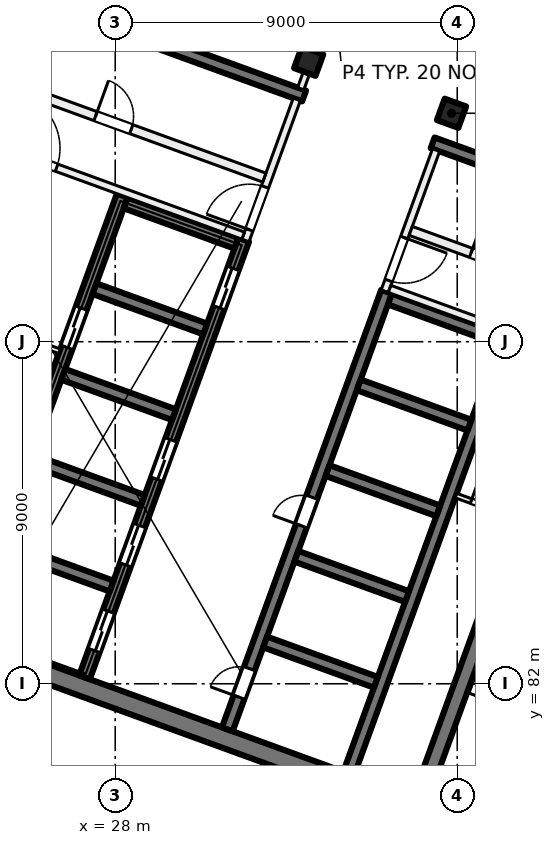
"""IFC4 building model, lengths in metres.
Left out: names, types, materials, properties, quantities, classifications, styles, units other than length and angle.
Written with IfcOpenShell. Run it as: python <this file> out.ifc"""

import sys

from ifc_helpers import new_model, si_unit, direction, frame, frame_2d, origin, origin_2d, place, context, subcontext, project, spatial, rectangle, extrude, element, fill, save


model = new_model("IFC4")
c1 = context("Model", 3, precision=1e-05, world=origin(), true_north=direction((0.0, 1.0)))
c2 = subcontext(c1, "Body", "Model", "MODEL_VIEW")
j1 = project(units=[si_unit("LENGTHUNIT", "METRE"), si_unit("PLANEANGLEUNIT", "RADIAN")], contexts=[c1])
p1 = place(None, origin())
s1 = spatial("IfcSite", under=j1, at=p1, CompositionType="ELEMENT")
p2 = place(p1, origin())
s2 = spatial("IfcBuilding", under=s1, at=p2, CompositionType="ELEMENT")
p3 = place(p2, frame((0.0, 0.0, 232.0)))
s3 = spatial("IfcBuildingStorey", under=s2, at=p3, CompositionType="ELEMENT", Elevation=232.0)
for number, where, z_axis, x_axis in (
    (1, (36.849, 97.011, 0.0), (0.0, 0.0, 1.0), (-0.342, -0.94, 0.0)),
    (2, (33.091, 98.379, 0.0), (0.0, 0.0, 1.0), (-0.342, -0.94, 0.0)),
):
    element("IfcColumn", number, at=place(p3, frame(where, z_axis=z_axis, x_axis=x_axis)), inside=s3, PredefinedType="COLUMN", context=c2, shape_type="SweptSolid", body=[
        extrude(rectangle(XDim=0.6, YDim=0.6, at=origin_2d()), origin(), (0.0, 0.0, 1.0), 4.0),
    ])
p4 = place(p3, frame((35.75, 78.788, 0.0), z_axis=(0.0, 0.0, 1.0), x_axis=(-0.939692894512, 0.342019391267, 0.0)))
e3 = element("IfcWall", 3, at=p4, inside=s3, PredefinedType="SHEAR", context=c2, shape_type="SweptSolid", body=[
    extrude(rectangle(XDim=14.4, YDim=0.5, at=frame_2d((7.2, 0.0))), origin(), (0.0, 0.0, 1.0), 4.0),
])
p5 = place(p3, frame((36.058, 79.048, 0.0), z_axis=(0.0, 0.0, 1.0), x_axis=(0.342016982193, 0.939693771338, 0.0)))
e4 = element("IfcWall", 4, at=p5, inside=s3, PredefinedType="SHEAR", context=c2, shape_type="SweptSolid", body=[
    extrude(rectangle(XDim=7.8, YDim=0.4, at=frame_2d((3.9, 0.0))), origin(), (0.0, 0.0, 1.0), 4.0),
])
p6 = place(p3, frame((30.949, 80.801, 0.0), z_axis=(0.0, 0.0, 1.0), x_axis=(0.342016684409, 0.939693879721, 0.0)))
e5 = element("IfcWall", 5, at=p6, inside=s3, PredefinedType="SHEAR", context=c2, shape_type="SweptSolid", body=[
    extrude(rectangle(XDim=12.25, YDim=0.3, at=frame_2d((6.125, 0.0))), origin(), (0.0, 0.0, 1.0), 4.0),
])
p7 = place(p6, frame((0.9, 0.0, 0.0)))
e6 = element("IfcOpeningElement", 6, at=p7, cuts=e5, PredefinedType="OPENING", context=c2, shape_type="SweptSolid", body=[
    extrude(rectangle(XDim=0.8, YDim=2.1, at=frame_2d((0.4, 1.05))), frame((0.0, 0.16, 0.0), z_axis=(0.0, -1.0, 0.0), x_axis=(1.0, 0.0, 0.0)), (0.0, 0.0, 1.0), 0.32),
])
p8 = place(p6, frame((5.7, 0.0, 0.0)))
e7 = element("IfcOpeningElement", 7, at=p8, cuts=e5, PredefinedType="OPENING", context=c2, shape_type="SweptSolid", body=[
    extrude(rectangle(XDim=0.8, YDim=2.1, at=frame_2d((0.4, 1.05))), frame((0.0, 0.16, 0.0), z_axis=(0.0, -1.0, 0.0), x_axis=(1.0, 0.0, 0.0)), (0.0, 0.0, 1.0), 0.32),
])
p9 = place(p3, frame((34.144, 79.638, 0.0), z_axis=(0.0, 0.0, 1.0), x_axis=(0.342016684409, 0.939693879721, 0.0)))
e8 = element("IfcWall", 8, at=p9, inside=s3, PredefinedType="SHEAR", context=c2, shape_type="SweptSolid", body=[
    extrude(rectangle(XDim=12.25, YDim=0.3, at=frame_2d((6.125, 0.0))), origin(), (0.0, 0.0, 1.0), 4.0),
])
p10 = place(p3, frame((34.858, 82.039, 0.0), z_axis=(0.0, 0.0, 1.0), x_axis=(-0.939689908313, 0.342027595692, 0.0)))
e9 = element("IfcWall", 9, at=p10, inside=s3, PredefinedType="SHEAR", context=c2, shape_type="SweptSolid", body=[
    extrude(rectangle(XDim=3.1, YDim=0.3, at=frame_2d((1.55, 0.0))), origin(), (0.0, 0.0, 1.0), 4.0),
])
p11 = place(p3, frame((35.679, 84.294, 0.0), z_axis=(0.0, 0.0, 1.0), x_axis=(-0.939706007505, 0.341983361377, 0.0)))
e10 = element("IfcWall", 10, at=p11, inside=s3, PredefinedType="SHEAR", context=c2, shape_type="SweptSolid", body=[
    extrude(rectangle(XDim=3.1, YDim=0.3, at=frame_2d((1.55, 0.0))), origin(), (0.0, 0.0, 1.0), 4.0),
])
for number, where, z_axis, x_axis in (
    (11, (36.5, 86.549, 0.0), (0.0, 0.0, 1.0), (-0.94, 0.342, 0.0)),
    (12, (37.321, 88.805, 0.0), (0.0, 0.0, 1.0), (-0.94, 0.342, 0.0)),
    (13, (38.142, 91.06, 0.0), (0.0, 0.0, 1.0), (-0.94, 0.342, 0.0)),
):
    element("IfcWall", number, at=place(p3, frame(where, z_axis=z_axis, x_axis=x_axis)), inside=s3, PredefinedType="SHEAR", context=c2, shape_type="SweptSolid", body=[
        extrude(rectangle(XDim=3.1, YDim=0.3, at=frame_2d((1.55, 0.0))), origin(), (0.0, 0.0, 1.0), 4.0),
    ])
p12 = place(p3, frame((27.191, 82.169, 0.0), z_axis=(0.0, 0.0, 1.0), x_axis=(0.342016684409, 0.939693879721, 0.0)))
e14 = element("IfcWall", 14, at=p12, inside=s3, PredefinedType="SHEAR", context=c2, shape_type="SweptSolid", body=[
    extrude(rectangle(XDim=12.25, YDim=0.3, at=frame_2d((6.125, 0.0))), origin(), (0.0, 0.0, 1.0), 4.0),
])
p13 = place(p12, frame((0.75, 0.0, 0.0)))
e15 = element("IfcOpeningElement", 15, at=p13, cuts=e14, PredefinedType="OPENING", context=c2, shape_type="SweptSolid", body=[
    extrude(rectangle(XDim=1.1, YDim=2.1, at=frame_2d((0.55, 1.05))), frame((0.0, 0.16, 0.0), z_axis=(0.0, -1.0, 0.0), x_axis=(1.0, 0.0, 0.0)), (0.0, 0.0, 1.0), 0.32),
])
p14 = place(p12, frame((3.15, 0.0, 0.0)))
e16 = element("IfcOpeningElement", 16, at=p14, cuts=e14, PredefinedType="OPENING", context=c2, shape_type="SweptSolid", body=[
    extrude(rectangle(XDim=1.1, YDim=2.1, at=frame_2d((0.55, 1.05))), frame((0.0, 0.16, 0.0), z_axis=(0.0, -1.0, 0.0), x_axis=(1.0, 0.0, 0.0)), (0.0, 0.0, 1.0), 0.32),
])
p15 = place(p12, frame((5.55, 0.0, 0.0)))
e17 = element("IfcOpeningElement", 17, at=p15, cuts=e14, PredefinedType="OPENING", context=c2, shape_type="SweptSolid", body=[
    extrude(rectangle(XDim=1.1, YDim=2.1, at=frame_2d((0.55, 1.05))), frame((0.0, 0.16, 0.0), z_axis=(0.0, -1.0, 0.0), x_axis=(1.0, 0.0, 0.0)), (0.0, 0.0, 1.0), 0.32),
])
p16 = place(p12, frame((10.35, 0.0, 0.0)))
e18 = element("IfcOpeningElement", 18, at=p16, cuts=e14, PredefinedType="OPENING", context=c2, shape_type="SweptSolid", body=[
    extrude(rectangle(XDim=1.1, YDim=2.1, at=frame_2d((0.55, 1.05))), frame((0.0, 0.16, 0.0), z_axis=(0.0, -1.0, 0.0), x_axis=(1.0, 0.0, 0.0)), (0.0, 0.0, 1.0), 0.32),
])
p17 = place(p3, frame((23.996, 83.332, 0.0), z_axis=(0.0, 0.0, 1.0), x_axis=(0.342016684409, 0.939693879721, 0.0)))
e19 = element("IfcWall", 19, at=p17, inside=s3, PredefinedType="SHEAR", context=c2, shape_type="SweptSolid", body=[
    extrude(rectangle(XDim=12.25, YDim=0.3, at=frame_2d((6.125, 0.0))), origin(), (0.0, 0.0, 1.0), 4.0),
])
p18 = place(p17, frame((8.0, 0.0, 0.0)))
e20 = element("IfcOpeningElement", 20, at=p18, cuts=e19, PredefinedType="OPENING", context=c2, shape_type="SweptSolid", body=[
    extrude(rectangle(XDim=1.1, YDim=2.1, at=frame_2d((0.55, 1.05))), frame((0.0, 0.16, 0.0), z_axis=(0.0, -1.0, 0.0), x_axis=(1.0, 0.0, 0.0)), (0.0, 0.0, 1.0), 0.32),
])
for number, where, z_axis, x_axis in (
    (21, (27.905, 84.57, 0.0), (0.0, 0.0, 1.0), (-0.94, 0.342, 0.0)),
    (22, (28.726, 86.825, 0.0), (0.0, 0.0, 1.0), (-0.94, 0.342, 0.0)),
    (23, (29.546, 89.08, 0.0), (0.0, 0.0, 1.0), (-0.94, 0.342, 0.0)),
):
    element("IfcWall", number, at=place(p3, frame(where, z_axis=z_axis, x_axis=x_axis)), inside=s3, PredefinedType="SHEAR", context=c2, shape_type="SweptSolid", body=[
        extrude(rectangle(XDim=3.1, YDim=0.3, at=frame_2d((1.55, 0.0))), origin(), (0.0, 0.0, 1.0), 4.0),
    ])
for number, where, z_axis, x_axis in (
    (24, (30.367, 91.336, 0.0), (0.0, 0.0, 1.0), (-0.94, 0.342, 0.0)),
    (25, (31.188, 93.591, 0.0), (0.0, 0.0, 1.0), (-0.94, 0.342, 0.0)),
):
    element("IfcWall", number, at=place(p3, frame(where, z_axis=z_axis, x_axis=x_axis)), inside=s3, PredefinedType="SHEAR", context=c2, shape_type="SweptSolid", body=[
        extrude(rectangle(XDim=3.1, YDim=0.3, at=frame_2d((1.55, 0.0))), origin(), (0.0, 0.0, 1.0), 4.0),
    ])
p19 = place(p3, frame((44.529, 93.258, 0.0), z_axis=(0.0, 0.0, 1.0), x_axis=(-0.9396917844, 0.342022441267, 0.0)))
e26 = element("IfcWall", 26, at=p19, inside=s3, PredefinedType="SHEAR", context=c2, shape_type="SweptSolid", body=[
    extrude(rectangle(XDim=8.7, YDim=0.3, at=frame_2d((4.35, 0.0))), origin(), (0.0, 0.0, 1.0), 4.0),
])
p20 = place(p3, frame((32.971, 97.465, 0.0), z_axis=(0.0, 0.0, 1.0), x_axis=(-0.939695066972, 0.34201342241, 0.0)))
e27 = element("IfcWall", 27, at=p20, inside=s3, PredefinedType="SHEAR", context=c2, shape_type="SweptSolid", body=[
    extrude(rectangle(XDim=8.7, YDim=0.3, at=frame_2d((4.35, 0.0))), origin(), (0.0, 0.0, 1.0), 4.0),
])
p21 = place(p3, frame((31.427, 93.663, 0.0), z_axis=(0.0, 0.0, 1.0), x_axis=(0.342030870568, 0.93968871632, 0.0)))
e28 = element("IfcWall", 28, at=p21, inside=s3, PredefinedType="PARTITIONING", context=c2, shape_type="SweptSolid", body=[
    extrude(rectangle(XDim=3.95, YDim=0.2, at=frame_2d((1.975, 0.0))), origin(), (0.0, 0.0, 1.0), 3.625),
])
p22 = place(p21, frame((0.3, 0.0, 0.0)))
e29 = element("IfcOpeningElement", 29, at=p22, cuts=e28, PredefinedType="OPENING", context=c2, shape_type="SweptSolid", body=[
    extrude(rectangle(XDim=1.2, YDim=2.1, at=frame_2d((0.6, 1.05))), frame((0.0, 0.11, 0.0), z_axis=(0.0, -1.0, 0.0), x_axis=(1.0, 0.0, 0.0)), (0.0, 0.0, 1.0), 0.22),
])
p23 = place(p3, frame((23.427, 96.682, 0.0), z_axis=(0.0, 0.0, 1.0), x_axis=(0.939690465531, -0.342026064782, 0.0)))
e30 = element("IfcWall", 30, at=p23, inside=s3, PredefinedType="PARTITIONING", context=c2, shape_type="SweptSolid", body=[
    extrude(rectangle(XDim=8.45, YDim=0.2, at=frame_2d((4.225, 0.0))), origin(), (0.0, 0.0, 1.0), 3.625),
])
p24 = place(p23, frame((1.725, 0.0, 0.0)))
e31 = element("IfcOpeningElement", 31, at=p24, cuts=e30, PredefinedType="OPENING", context=c2, shape_type="SweptSolid", body=[
    extrude(rectangle(XDim=1.5, YDim=2.1, at=frame_2d((0.75, 1.05))), frame((0.0, 0.11, 0.0), z_axis=(0.0, -1.0, 0.0), x_axis=(1.0, 0.0, 0.0)), (0.0, 0.0, 1.0), 0.22),
])
p25 = place(p3, frame((23.983, 98.208, 0.0), z_axis=(0.0, 0.0, 1.0), x_axis=(0.939699751196, -0.342000552051, 0.0)))
e32 = element("IfcWall", 32, at=p25, inside=s3, PredefinedType="PARTITIONING", context=c2, shape_type="SweptSolid", body=[
    extrude(rectangle(XDim=8.45, YDim=0.25, at=frame_2d((4.225, 0.0))), origin(), (0.0, 0.0, 1.0), 3.625),
])
p26 = place(p25, frame((3.725, 0.0, 0.0)))
e33 = element("IfcOpeningElement", 33, at=p26, cuts=e32, PredefinedType="OPENING", context=c2, shape_type="SweptSolid", body=[
    extrude(rectangle(XDim=1.0, YDim=2.1, at=frame_2d((0.5, 1.05))), frame((0.0, 0.135, 0.0), z_axis=(0.0, -1.0, 0.0), x_axis=(1.0, 0.0, 0.0)), (0.0, 0.0, 1.0), 0.27),
])
p27 = place(p3, frame((24.985, 91.312, 0.0), z_axis=(0.0, 0.0, 1.0), x_axis=(0.939719959755, -0.341945020783, 0.0)))
e34 = element("IfcWall", 34, at=p27, inside=s3, PredefinedType="PARTITIONING", context=c2, shape_type="SweptSolid", body=[
    extrude(rectangle(XDim=1.65, YDim=0.125, at=frame_2d((0.825, 0.0))), origin(), (0.0, 0.0, 1.0), 3.625),
])
p28 = place(p27, frame((0.425, 0.0, 0.0)))
e35 = element("IfcOpeningElement", 35, at=p28, cuts=e34, PredefinedType="OPENING", context=c2, shape_type="SweptSolid", body=[
    extrude(rectangle(XDim=0.8, YDim=2.1, at=frame_2d((0.4, 1.05))), frame((0.0, 0.073, 0.0), z_axis=(0.0, -1.0, 0.0), x_axis=(1.0, 0.0, 0.0)), (0.0, 0.0, 1.0), 0.145),
])
p29 = place(p3, frame((36.443, 96.041, 0.0), z_axis=(0.0, 0.0, 1.0), x_axis=(-0.341996156931, -0.939701350773, 0.0)))
e36 = element("IfcWall", 36, at=p29, inside=s3, PredefinedType="PARTITIONING", context=c2, shape_type="SweptSolid", body=[
    extrude(rectangle(XDim=3.95, YDim=0.2, at=frame_2d((1.975, 0.0))), origin(), (0.0, 0.0, 1.0), 3.625),
])
p30 = place(p29, frame((2.45, 0.0, 0.0)))
e37 = element("IfcOpeningElement", 37, at=p30, cuts=e36, PredefinedType="OPENING", context=c2, shape_type="SweptSolid", body=[
    extrude(rectangle(XDim=1.2, YDim=2.1, at=frame_2d((0.6, 1.05))), frame((0.0, 0.11, 0.0), z_axis=(0.0, -1.0, 0.0), x_axis=(1.0, 0.0, 0.0)), (0.0, 0.0, 1.0), 0.22),
])
p31 = place(p3, frame((35.22, 92.389, 0.0), z_axis=(0.0, 0.0, 1.0), x_axis=(0.939690465531, -0.342026064782, 0.0)))
e38 = element("IfcWall", 38, at=p31, inside=s3, PredefinedType="PARTITIONING", context=c2, shape_type="SweptSolid", body=[
    extrude(rectangle(XDim=8.45, YDim=0.2, at=frame_2d((4.225, 0.0))), origin(), (0.0, 0.0, 1.0), 3.625),
])
p32 = place(p31, frame((5.225, 0.0, 0.0)))
e39 = element("IfcOpeningElement", 39, at=p32, cuts=e38, PredefinedType="OPENING", context=c2, shape_type="SweptSolid", body=[
    extrude(rectangle(XDim=1.5, YDim=2.1, at=frame_2d((0.75, 1.05))), frame((0.0, 0.11, 0.0), z_axis=(0.0, -1.0, 0.0), x_axis=(1.0, 0.0, 0.0)), (0.0, 0.0, 1.0), 0.22),
])
p33 = place(p3, frame((35.776, 93.916, 0.0), z_axis=(0.0, 0.0, 1.0), x_axis=(0.939690465531, -0.342026064782, 0.0)))
e40 = element("IfcWall", 40, at=p33, inside=s3, PredefinedType="PARTITIONING", context=c2, shape_type="SweptSolid", body=[
    extrude(rectangle(XDim=8.45, YDim=0.25, at=frame_2d((4.225, 0.0))), origin(), (0.0, 0.0, 1.0), 3.625),
])
p34 = place(p33, frame((1.69, 0.0, 0.0)))
e41 = element("IfcOpeningElement", 41, at=p34, cuts=e40, PredefinedType="OPENING", context=c2, shape_type="SweptSolid", body=[
    extrude(rectangle(XDim=0.8, YDim=2.1, at=frame_2d((0.4, 1.05))), frame((0.0, 0.135, 0.0), z_axis=(0.0, -1.0, 0.0), x_axis=(1.0, 0.0, 0.0)), (0.0, 0.0, 1.0), 0.27),
])
p35 = place(p33, frame((5.965, 0.0, 0.0)))
e42 = element("IfcOpeningElement", 42, at=p35, cuts=e40, PredefinedType="OPENING", context=c2, shape_type="SweptSolid", body=[
    extrude(rectangle(XDim=0.8, YDim=2.1, at=frame_2d((0.4, 1.05))), frame((0.0, 0.135, 0.0), z_axis=(0.0, -1.0, 0.0), x_axis=(1.0, 0.0, 0.0)), (0.0, 0.0, 1.0), 0.27),
])
p36 = place(p3, frame((36.966, 86.952, 0.0), z_axis=(0.0, 0.0, 1.0), x_axis=(0.939672407396, -0.342075674051, 0.0)))
e43 = element("IfcWall", 43, at=p36, inside=s3, PredefinedType="PARTITIONING", context=c2, shape_type="SweptSolid", body=[
    extrude(rectangle(XDim=1.65, YDim=0.125, at=frame_2d((0.825, 0.0))), origin(), (0.0, 0.0, 1.0), 3.625),
])
p37 = place(p36, frame((0.425, 0.0, 0.0)))
e44 = element("IfcOpeningElement", 44, at=p37, cuts=e43, PredefinedType="OPENING", context=c2, shape_type="SweptSolid", body=[
    extrude(rectangle(XDim=0.8, YDim=2.1, at=frame_2d((0.4, 1.05))), frame((0.0, 0.073, 0.0), z_axis=(0.0, -1.0, 0.0), x_axis=(1.0, 0.0, 0.0)), (0.0, 0.0, 1.0), 0.145),
])
p38 = place(p3, frame((32.881, 97.657, 0.0), z_axis=(0.0, 0.0, 1.0), x_axis=(0.342058204353, 0.939678766832, 0.0)))
e45 = element("IfcWall", 45, at=p38, inside=s3, PredefinedType="PARTITIONING", context=c2, shape_type="SweptSolid", body=[
    extrude(rectangle(XDim=5.163, YDim=0.175, at=frame_2d((2.581, 0.0))), origin(), (0.0, 0.0, 1.0), 3.625),
])
p39 = place(p38, frame((1.991, 0.0, 0.0)))
e46 = element("IfcOpeningElement", 46, at=p39, cuts=e45, PredefinedType="OPENING", context=c2, shape_type="SweptSolid", body=[
    extrude(rectangle(XDim=1.2, YDim=2.1, at=frame_2d((0.6, 1.05))), frame((0.0, 0.097, 0.0), z_axis=(0.0, -1.0, 0.0), x_axis=(1.0, 0.0, 0.0)), (0.0, 0.0, 1.0), 0.195),
])
p40 = place(p13, origin())
e47 = element("IfcDoor", 47, at=p40, inside=s3, OperationType="DOUBLE_DOOR_SLIDING", PredefinedType="DOOR", context=c2, shape_type="SweptSolid", body=[
    extrude(rectangle(XDim=1.1, YDim=2.1, at=frame_2d((0.55, 1.05))), frame((0.0, 0.025, 0.0), z_axis=(0.0, -1.0, 0.0), x_axis=(1.0, 0.0, 0.0)), (0.0, 0.0, 1.0), 0.05),
])
fill(e15, e47)
p41 = place(p14, origin())
e48 = element("IfcDoor", 48, at=p41, inside=s3, OperationType="DOUBLE_DOOR_SLIDING", PredefinedType="DOOR", context=c2, shape_type="SweptSolid", body=[
    extrude(rectangle(XDim=1.1, YDim=2.1, at=frame_2d((0.55, 1.05))), frame((0.0, 0.025, 0.0), z_axis=(0.0, -1.0, 0.0), x_axis=(1.0, 0.0, 0.0)), (0.0, 0.0, 1.0), 0.05),
])
fill(e16, e48)
p42 = place(p15, origin())
e49 = element("IfcDoor", 49, at=p42, inside=s3, OperationType="DOUBLE_DOOR_SLIDING", PredefinedType="DOOR", context=c2, shape_type="SweptSolid", body=[
    extrude(rectangle(XDim=1.1, YDim=2.1, at=frame_2d((0.55, 1.05))), frame((0.0, 0.025, 0.0), z_axis=(0.0, -1.0, 0.0), x_axis=(1.0, 0.0, 0.0)), (0.0, 0.0, 1.0), 0.05),
])
fill(e17, e49)
p43 = place(p16, origin())
e50 = element("IfcDoor", 50, at=p43, inside=s3, OperationType="DOUBLE_DOOR_SLIDING", PredefinedType="DOOR", context=c2, shape_type="SweptSolid", body=[
    extrude(rectangle(XDim=1.1, YDim=2.1, at=frame_2d((0.55, 1.05))), frame((0.0, 0.025, 0.0), z_axis=(0.0, -1.0, 0.0), x_axis=(1.0, 0.0, 0.0)), (0.0, 0.0, 1.0), 0.05),
])
fill(e18, e50)
p44 = place(p7, origin())
e51 = element("IfcDoor", 51, at=p44, inside=s3, OperationType="SINGLE_SWING_LEFT", PredefinedType="DOOR", context=c2, shape_type="SweptSolid", body=[
    extrude(rectangle(XDim=0.8, YDim=2.1, at=frame_2d((0.4, 1.05))), frame((0.0, 0.025, 0.0), z_axis=(0.0, -1.0, 0.0), x_axis=(1.0, 0.0, 0.0)), (0.0, 0.0, 1.0), 0.05),
])
fill(e6, e51)
p45 = place(p8, origin())
e52 = element("IfcDoor", 52, at=p45, inside=s3, OperationType="SINGLE_SWING_RIGHT", PredefinedType="DOOR", context=c2, shape_type="SweptSolid", body=[
    extrude(rectangle(XDim=0.8, YDim=2.1, at=frame_2d((0.4, 1.05))), frame((0.0, 0.025, 0.0), z_axis=(0.0, -1.0, 0.0), x_axis=(1.0, 0.0, 0.0)), (0.0, 0.0, 1.0), 0.05),
])
fill(e7, e52)
p46 = place(p22, origin())
e53 = element("IfcDoor", 53, at=p46, inside=s3, OperationType="DOUBLE_DOOR_SINGLE_SWING", PredefinedType="DOOR", context=c2, shape_type="SweptSolid", body=[
    extrude(rectangle(XDim=1.2, YDim=2.1, at=frame_2d((0.6, 1.05))), frame((0.0, 0.025, 0.0), z_axis=(0.0, -1.0, 0.0), x_axis=(1.0, 0.0, 0.0)), (0.0, 0.0, 1.0), 0.05),
])
fill(e29, e53)
p47 = place(p24, origin())
e54 = element("IfcDoor", 54, at=p47, inside=s3, OperationType="DOUBLE_DOOR_SINGLE_SWING", PredefinedType="DOOR", context=c2, shape_type="SweptSolid", body=[
    extrude(rectangle(XDim=1.5, YDim=2.1, at=frame_2d((0.75, 1.05))), frame((0.0, 0.025, 0.0), z_axis=(0.0, -1.0, 0.0), x_axis=(1.0, 0.0, 0.0)), (0.0, 0.0, 1.0), 0.05),
])
fill(e31, e54)
p48 = place(p26, origin())
e55 = element("IfcDoor", 55, at=p48, inside=s3, OperationType="SINGLE_SWING_LEFT", PredefinedType="DOOR", context=c2, shape_type="SweptSolid", body=[
    extrude(rectangle(XDim=1.0, YDim=2.1, at=frame_2d((0.5, 1.05))), frame((0.0, 0.025, 0.0), z_axis=(0.0, -1.0, 0.0), x_axis=(1.0, 0.0, 0.0)), (0.0, 0.0, 1.0), 0.05),
])
fill(e33, e55)
p49 = place(p30, origin())
e56 = element("IfcDoor", 56, at=p49, inside=s3, OperationType="DOUBLE_DOOR_SINGLE_SWING", PredefinedType="DOOR", context=c2, shape_type="SweptSolid", body=[
    extrude(rectangle(XDim=1.2, YDim=2.1, at=frame_2d((0.6, 1.05))), frame((0.0, 0.025, 0.0), z_axis=(0.0, -1.0, 0.0), x_axis=(1.0, 0.0, 0.0)), (0.0, 0.0, 1.0), 0.05),
])
fill(e37, e56)
p50 = place(p37, origin())
e57 = element("IfcDoor", 57, at=p50, inside=s3, OperationType="SINGLE_SWING_LEFT", PredefinedType="DOOR", context=c2, shape_type="SweptSolid", body=[
    extrude(rectangle(XDim=0.8, YDim=2.1, at=frame_2d((0.4, 1.05))), frame((0.0, 0.025, 0.0), z_axis=(0.0, -1.0, 0.0), x_axis=(1.0, 0.0, 0.0)), (0.0, 0.0, 1.0), 0.05),
])
fill(e44, e57)
p51 = place(p34, origin())
e58 = element("IfcDoor", 58, at=p51, inside=s3, OperationType="SINGLE_SWING_RIGHT", PredefinedType="DOOR", context=c2, shape_type="SweptSolid", body=[
    extrude(rectangle(XDim=0.8, YDim=2.1, at=frame_2d((0.4, 1.05))), frame((0.0, 0.025, 0.0), z_axis=(0.0, -1.0, 0.0), x_axis=(1.0, 0.0, 0.0)), (0.0, 0.0, 1.0), 0.05),
])
fill(e41, e58)
p52 = place(p18, origin())
e59 = element("IfcDoor", 59, at=p52, inside=s3, OperationType="DOUBLE_DOOR_SLIDING", PredefinedType="DOOR", context=c2, shape_type="SweptSolid", body=[
    extrude(rectangle(XDim=1.1, YDim=2.1, at=frame_2d((0.55, 1.05))), frame((0.0, 0.025, 0.0), z_axis=(0.0, -1.0, 0.0), x_axis=(1.0, 0.0, 0.0)), (0.0, 0.0, 1.0), 0.05),
])
fill(e20, e59)
save(model, sys.argv[1])
